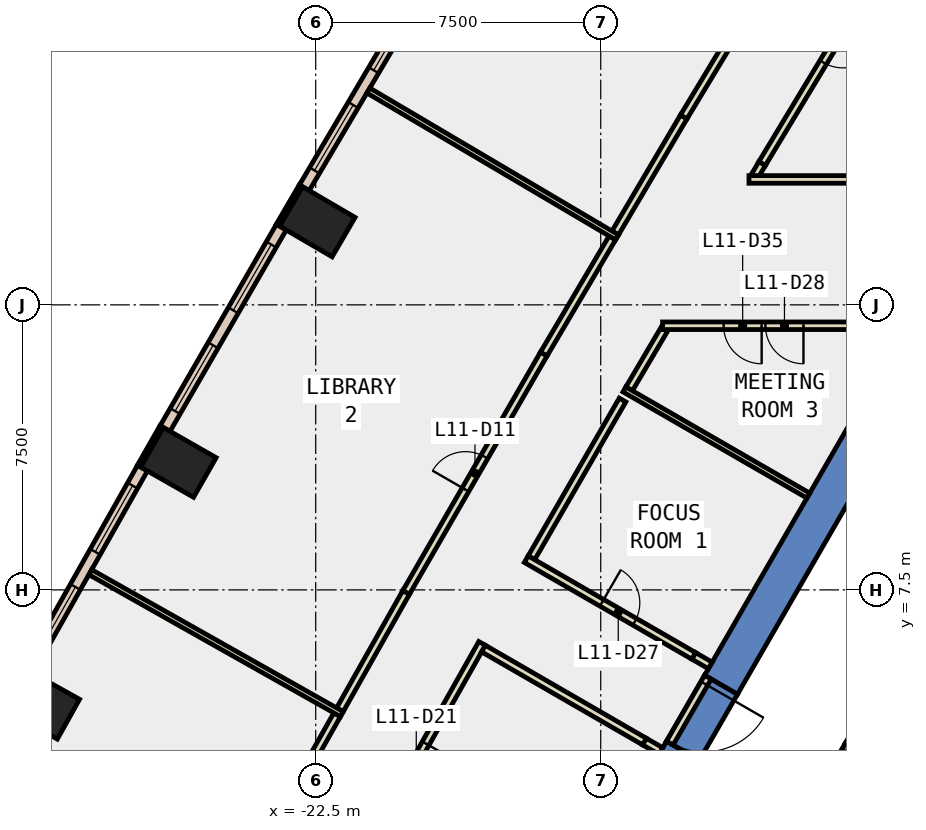
"""IFC4 building model, lengths in metres.
Left out: names, types, materials, properties, quantities, classifications, styles, units other than length and angle.
Written with IfcOpenShell. Run it as: python <this file> out.ifc"""

import sys

from ifc_helpers import new_model, si_unit, direction, frame, frame_2d, origin, origin_2d, place, context, subcontext, project, spatial, polyline, rectangle, outline, extrude, element, fill, save


model = new_model("IFC4")
c1 = context("Model", 3, precision=1e-05, world=origin(), true_north=direction((0.0, 1.0)))
c2 = subcontext(c1, "Body", "Model", "MODEL_VIEW")
j1 = project(units=[si_unit("LENGTHUNIT", "METRE"), si_unit("PLANEANGLEUNIT", "RADIAN")], contexts=[c1])
p1 = place(None, origin())
s1 = spatial("IfcSite", under=j1, at=p1, CompositionType="ELEMENT")
p2 = place(p1, origin())
s2 = spatial("IfcBuilding", under=s1, at=p2, CompositionType="ELEMENT")
p3 = place(p2, frame((0.0, 0.0, 56.0)))
s3 = spatial("IfcBuildingStorey", under=s2, at=p3, CompositionType="ELEMENT", Elevation=56.0)
for number, where, z_axis, x_axis in (
    (1, (-22.457, 17.186, -0.4), (0.0, 0.0, 1.0), (0.504, 0.864, 0.0)),
    (2, (-26.112, 10.855, -0.4), (0.0, 0.0, 1.0), (0.496, 0.869, 0.0)),
    (3, (-29.706, 4.487, -0.4), (0.0, 0.0, 1.0), (0.487, 0.873, 0.0)),
):
    element("IfcColumn", number, at=place(p3, frame(where, z_axis=z_axis, x_axis=x_axis)), inside=s3, PredefinedType="COLUMN", context=c2, shape_type="SweptSolid", body=[
        extrude(rectangle(XDim=1.2, YDim=1.6, at=origin_2d()), origin(), (0.0, 0.0, 1.0), 4.2),
    ])
p4 = place(p3, frame((0.0, 0.0, -0.4)))
e4 = element("IfcWall", 4, at=p4, inside=s3, PredefinedType="SHEAR", context=c2, shape_type="SweptSolid", body=[
    extrude(outline(polyline([(-12.267, 5.252), (-11.402, 4.752), (-6.351, 13.5), (-6.928, 14.5), (-12.267, 5.252)])), origin(), (0.0, 0.0, 1.0), 4.2),
])
p5 = place(p3, frame((0.0, 0.0, -0.4)))
e5 = element("IfcWall", 5, at=p5, inside=s3, PredefinedType="SHEAR", context=c2, shape_type="SweptSolid", body=[
    extrude(outline(polyline([(-12.402, 3.02), (-13.267, 3.52), (-13.856, 2.5), (-12.702, 2.5), (-12.402, 3.02)])), origin(), (0.0, 0.0, 1.0), 4.2),
])
p6 = place(p3, frame((0.0, 0.0, 3.6)))
e6 = element("IfcWall", 6, at=p6, inside=s3, PredefinedType="SHEAR", context=c2, shape_type="SweptSolid", body=[
    extrude(outline(polyline([(-13.267, 3.52), (-12.402, 3.02), (-11.402, 4.752), (-12.267, 5.252), (-13.267, 3.52)])), origin(), (0.0, 0.0, 1.0), 0.2),
])
p7 = place(p3, frame((-22.888, 18.133, 0.0), z_axis=(0.0, 0.0, 1.0), x_axis=(-0.504225229382, -0.863572184623, 0.0)))
e7 = element("IfcWall", 7, at=p7, inside=s3, PredefinedType="STANDARD", context=c2, shape_type="SweptSolid", body=[
    extrude(rectangle(XDim=1.2, YDim=0.1, at=frame_2d((0.6, 0.0))), origin(), (0.0, 0.0, 1.0), 3.8),
])
p8 = place(p3, frame((-26.553, 11.797, 0.0), z_axis=(0.0, 0.0, 1.0), x_axis=(-0.495766453659, -0.86845588456, 0.0)))
e8 = element("IfcWall", 8, at=p8, inside=s3, PredefinedType="STANDARD", context=c2, shape_type="SweptSolid", body=[
    extrude(rectangle(XDim=1.2, YDim=0.1, at=frame_2d((0.6, 0.0))), origin(), (0.0, 0.0, 1.0), 3.8),
])
p9 = place(p3, frame((-19.688, 23.351, 0.0), z_axis=(0.0, 0.0, 1.0), x_axis=(-0.508412153373, -0.861113861404, 0.0)))
e9 = element("IfcWall", 9, at=p9, inside=s3, PredefinedType="STANDARD", context=c2, shape_type="SweptSolid", body=[
    extrude(rectangle(XDim=6.121, YDim=0.3, at=frame_2d((3.061, 0.0))), origin(), (0.0, 0.0, 1.0), 3.8),
])
p10 = place(p9, frame((0.53, 0.0, 0.9)))
e10 = element("IfcOpeningElement", 10, at=p10, cuts=e9, PredefinedType="OPENING", context=c2, shape_type="SweptSolid", body=[
    extrude(rectangle(XDim=2.0, YDim=2.6, at=frame_2d((1.0, 1.3))), frame((0.0, 0.16, 0.0), z_axis=(0.0, -1.0, 0.0), x_axis=(1.0, 0.0, 0.0)), (0.0, 0.0, 1.0), 0.32),
])
p11 = place(p9, frame((3.591, 0.0, 0.9)))
e11 = element("IfcOpeningElement", 11, at=p11, cuts=e9, PredefinedType="OPENING", context=c2, shape_type="SweptSolid", body=[
    extrude(rectangle(XDim=2.0, YDim=2.6, at=frame_2d((1.0, 1.3))), frame((0.0, 0.16, 0.0), z_axis=(0.0, -1.0, 0.0), x_axis=(1.0, 0.0, 0.0)), (0.0, 0.0, 1.0), 0.32),
])
p12 = place(p3, frame((-23.404, 17.046, 0.0), z_axis=(0.0, 0.0, 1.0), x_axis=(-0.499957248001, -0.866050085256, 0.0)))
e12 = element("IfcWall", 12, at=p12, inside=s3, PredefinedType="STANDARD", context=c2, shape_type="SweptSolid", body=[
    extrude(rectangle(XDim=6.121, YDim=0.3, at=frame_2d((3.06, 0.0))), origin(), (0.0, 0.0, 1.0), 3.8),
])
p13 = place(p12, frame((0.53, 0.0, 0.9)))
e13 = element("IfcOpeningElement", 13, at=p13, cuts=e12, PredefinedType="OPENING", context=c2, shape_type="SweptSolid", body=[
    extrude(rectangle(XDim=2.0, YDim=2.6, at=frame_2d((1.0, 1.3))), frame((0.0, 0.16, 0.0), z_axis=(0.0, -1.0, 0.0), x_axis=(1.0, 0.0, 0.0)), (0.0, 0.0, 1.0), 0.32),
])
p14 = place(p12, frame((3.591, 0.0, 0.9)))
e14 = element("IfcOpeningElement", 14, at=p14, cuts=e12, PredefinedType="OPENING", context=c2, shape_type="SweptSolid", body=[
    extrude(rectangle(XDim=2.0, YDim=2.6, at=frame_2d((1.0, 1.3))), frame((0.0, 0.16, 0.0), z_axis=(0.0, -1.0, 0.0), x_axis=(1.0, 0.0, 0.0)), (0.0, 0.0, 1.0), 0.32),
])
p15 = place(p3, frame((-27.058, 10.705, 0.0), z_axis=(0.0, 0.0, 1.0), x_axis=(-0.49151046248, -0.870871669807, 0.0)))
e15 = element("IfcWall", 15, at=p15, inside=s3, PredefinedType="STANDARD", context=c2, shape_type="SweptSolid", body=[
    extrude(rectangle(XDim=6.122, YDim=0.3, at=frame_2d((3.061, 0.0))), origin(), (0.0, 0.0, 1.0), 3.8),
])
p16 = place(p15, frame((0.53, 0.0, 0.9)))
e16 = element("IfcOpeningElement", 16, at=p16, cuts=e15, PredefinedType="OPENING", context=c2, shape_type="SweptSolid", body=[
    extrude(rectangle(XDim=2.0, YDim=2.6, at=frame_2d((1.0, 1.3))), frame((0.0, 0.16, 0.0), z_axis=(0.0, -1.0, 0.0), x_axis=(1.0, 0.0, 0.0)), (0.0, 0.0, 1.0), 0.32),
])
p17 = place(p15, frame((3.591, 0.0, 0.9)))
e17 = element("IfcOpeningElement", 17, at=p17, cuts=e15, PredefinedType="OPENING", context=c2, shape_type="SweptSolid", body=[
    extrude(rectangle(XDim=2.0, YDim=2.6, at=frame_2d((1.0, 1.3))), frame((0.0, 0.16, 0.0), z_axis=(0.0, -1.0, 0.0), x_axis=(1.0, 0.0, 0.0)), (0.0, 0.0, 1.0), 0.32),
])
p18 = place(p3, frame((-14.425, 12.497, 0.0), z_axis=(0.0, 0.0, 1.0), x_axis=(-0.500026519606, -0.866010092142, 0.0)))
e18 = element("IfcWall", 18, at=p18, inside=s3, PredefinedType="PARTITIONING", context=c2, shape_type="SweptSolid", body=[
    extrude(rectangle(XDim=4.796, YDim=0.2, at=frame_2d((2.398, 0.0))), origin(), (0.0, 0.0, 1.0), 3.8),
])
p19 = place(p3, frame((-16.96, 8.308, 0.0), z_axis=(0.0, 0.0, 1.0), x_axis=(0.866018717003, -0.500011581666, 0.0)))
e19 = element("IfcWall", 19, at=p19, inside=s3, PredefinedType="PARTITIONING", context=c2, shape_type="SweptSolid", body=[
    extrude(rectangle(XDim=5.092, YDim=0.2, at=frame_2d((2.546, 0.0))), origin(), (0.0, 0.0, 1.0), 3.8),
])
p20 = place(p19, frame((2.296, 0.0, 0.0)))
e20 = element("IfcOpeningElement", 20, at=p20, cuts=e19, PredefinedType="OPENING", context=c2, shape_type="SweptSolid", body=[
    extrude(rectangle(XDim=1.0, YDim=2.1, at=frame_2d((0.5, 1.05))), frame((0.0, 0.11, 0.0), z_axis=(0.0, -1.0, 0.0), x_axis=(1.0, 0.0, 0.0)), (0.0, 0.0, 1.0), 0.22),
])
p21 = place(p3, frame((-13.323, 14.364, 0.0), z_axis=(0.0, 0.0, 1.0), x_axis=(-0.508274698505, -0.861195001646, 0.0)))
e21 = element("IfcWall", 21, at=p21, inside=s3, PredefinedType="PARTITIONING", context=c2, shape_type="SweptSolid", body=[
    extrude(rectangle(XDim=1.828, YDim=0.2, at=frame_2d((0.914, 0.0))), origin(), (0.0, 0.0, 1.0), 3.8),
])
p22 = place(p3, frame((-7.022, 24.899, 0.0), z_axis=(0.0, 0.0, 1.0), x_axis=(-0.516755973305, -0.856132737403, 0.0)))
e22 = element("IfcWall", 22, at=p22, inside=s3, PredefinedType="PARTITIONING", context=c2, shape_type="SweptSolid", body=[
    extrude(rectangle(XDim=7.222, YDim=0.2, at=frame_2d((3.611, 0.0))), origin(), (0.0, 0.0, 1.0), 3.8),
])
p23 = place(p22, frame((3.111, 0.0, 0.0)))
e23 = element("IfcOpeningElement", 23, at=p23, cuts=e22, PredefinedType="OPENING", context=c2, shape_type="SweptSolid", body=[
    extrude(rectangle(XDim=1.0, YDim=2.1, at=frame_2d((0.5, 1.05))), frame((0.0, 0.11, 0.0), z_axis=(0.0, -1.0, 0.0), x_axis=(1.0, 0.0, 0.0)), (0.0, 0.0, 1.0), 0.22),
])
p24 = place(p3, frame((-10.754, 18.716, 0.0), z_axis=(0.0, 0.0, 1.0), x_axis=(-0.506880801681, -0.862016155815, 0.0)))
e24 = element("IfcWall", 24, at=p24, inside=s3, PredefinedType="PARTITIONING", context=c2, shape_type="SweptSolid", body=[
    extrude(rectangle(XDim=0.383, YDim=0.2, at=frame_2d((0.191, 0.0))), origin(), (0.0, 0.0, 1.0), 3.8),
])
p25 = place(p3, frame((-13.417, 3.26, 0.0), z_axis=(0.0, 0.0, 1.0), x_axis=(-0.866071776036, 0.499919672301, 0.0)))
e25 = element("IfcWall", 25, at=p25, inside=s3, PredefinedType="PARTITIONING", context=c2, shape_type="SweptSolid", body=[
    extrude(rectangle(XDim=0.5, YDim=0.2, at=frame_2d((0.25, 0.0))), origin(), (0.0, 0.0, 1.0), 2.4),
])
p26 = place(p3, frame((-18.122, 6.092, 0.0), z_axis=(0.0, 0.0, 1.0), x_axis=(-0.491430359405, -0.870916874251, 0.0)))
e26 = element("IfcWall", 26, at=p26, inside=s3, PredefinedType="PARTITIONING", context=c2, shape_type="SweptSolid", body=[
    extrude(rectangle(XDim=7.047, YDim=0.2, at=frame_2d((3.523, 0.0))), origin(), (0.0, 0.0, 1.0), 3.8),
])
p27 = place(p26, frame((3.024, 0.0, 0.0)))
e27 = element("IfcOpeningElement", 27, at=p27, cuts=e26, PredefinedType="OPENING", context=c2, shape_type="SweptSolid", body=[
    extrude(rectangle(XDim=1.0, YDim=2.1, at=frame_2d((0.5, 1.05))), frame((0.0, 0.11, 0.0), z_axis=(0.0, -1.0, 0.0), x_axis=(1.0, 0.0, 0.0)), (0.0, 0.0, 1.0), 0.22),
])
p28 = place(p3, frame((-14.618, 16.891, 0.0), z_axis=(0.0, 0.0, 1.0), x_axis=(0.508267810274, 0.861199067022, 0.0)))
e28 = element("IfcWall", 28, at=p28, inside=s3, PredefinedType="PARTITIONING", context=c2, shape_type="SweptSolid", body=[
    extrude(rectangle(XDim=3.547, YDim=0.2, at=frame_2d((1.774, 0.0))), origin(), (0.0, 0.0, 1.0), 3.8),
])
p29 = place(p3, frame((-12.815, 19.946, 0.0), z_axis=(0.0, 0.0, 1.0), x_axis=(0.516822021522, 0.856092867667, 0.0)))
e29 = element("IfcWall", 29, at=p29, inside=s3, PredefinedType="PARTITIONING", context=c2, shape_type="SweptSolid", body=[
    extrude(rectangle(XDim=7.171, YDim=0.2, at=frame_2d((3.585, 0.0))), origin(), (0.0, 0.0, 1.0), 3.8),
])
p30 = place(p29, frame((3.16, 0.0, 0.0)))
e30 = element("IfcOpeningElement", 30, at=p30, cuts=e29, PredefinedType="OPENING", context=c2, shape_type="SweptSolid", body=[
    extrude(rectangle(XDim=1.0, YDim=2.1, at=frame_2d((0.5, 1.05))), frame((0.0, 0.11, 0.0), z_axis=(0.0, -1.0, 0.0), x_axis=(1.0, 0.0, 0.0)), (0.0, 0.0, 1.0), 0.22),
])
p31 = place(p3, frame((-21.863, 4.345, 0.0), z_axis=(0.0, 0.0, 1.0), x_axis=(0.491394823876, 0.87093692485, 0.0)))
e31 = element("IfcWall", 31, at=p31, inside=s3, PredefinedType="PARTITIONING", context=c2, shape_type="SweptSolid", body=[
    extrude(rectangle(XDim=3.547, YDim=0.2, at=frame_2d((1.773, 0.0))), origin(), (0.0, 0.0, 1.0), 3.8),
])
p32 = place(p3, frame((-20.12, 7.434, 0.0), z_axis=(0.0, 0.0, 1.0), x_axis=(0.500039488902, 0.866002603656, 0.0)))
e32 = element("IfcWall", 32, at=p32, inside=s3, PredefinedType="PARTITIONING", context=c2, shape_type="SweptSolid", body=[
    extrude(rectangle(XDim=7.244, YDim=0.2, at=frame_2d((3.622, 0.0))), origin(), (0.0, 0.0, 1.0), 3.8),
])
p33 = place(p32, frame((3.122, 0.0, 0.0)))
e33 = element("IfcOpeningElement", 33, at=p33, cuts=e32, PredefinedType="OPENING", context=c2, shape_type="SweptSolid", body=[
    extrude(rectangle(XDim=1.0, YDim=2.1, at=frame_2d((0.5, 1.05))), frame((0.0, 0.11, 0.0), z_axis=(0.0, -1.0, 0.0), x_axis=(1.0, 0.0, 0.0)), (0.0, 0.0, 1.0), 0.22),
])
p34 = place(p3, frame((-16.498, 13.707, 0.0), z_axis=(0.0, 0.0, 1.0), x_axis=(0.508471945541, 0.861078556578, 0.0)))
e34 = element("IfcWall", 34, at=p34, inside=s3, PredefinedType="PARTITIONING", context=c2, shape_type="SweptSolid", body=[
    extrude(rectangle(XDim=3.548, YDim=0.2, at=frame_2d((1.774, 0.0))), origin(), (0.0, 0.0, 1.0), 3.8),
])
p35 = place(p3, frame((-23.681, 1.124, 0.0), z_axis=(0.0, 0.0, 1.0), x_axis=(0.491485799319, 0.870885588965, 0.0)))
e35 = element("IfcWall", 35, at=p35, inside=s3, PredefinedType="PARTITIONING", context=c2, shape_type="SweptSolid", body=[
    extrude(rectangle(XDim=3.548, YDim=0.2, at=frame_2d((1.774, 0.0))), origin(), (0.0, 0.0, 1.0), 3.8),
])
p36 = place(p3, frame((-14.377, 12.775, 0.0), z_axis=(0.0, 0.0, 1.0), x_axis=(0.866051730117, -0.499954398681, 0.0)))
e36 = element("IfcWall", 36, at=p36, inside=s3, PredefinedType="PARTITIONING", context=c2, shape_type="SweptSolid", body=[
    extrude(rectangle(XDim=5.588, YDim=0.15, at=frame_2d((2.794, 0.0))), origin(), (0.0, 0.0, 1.0), 3.8),
])
p37 = place(p3, frame((-6.957, 14.45, 0.0), z_axis=(0.0, 0.0, 1.0), x_axis=(-1.0, 0.0, 0.0)))
e37 = element("IfcWall", 37, at=p37, inside=s3, PredefinedType="PARTITIONING", context=c2, shape_type="SweptSolid", body=[
    extrude(rectangle(XDim=6.415, YDim=0.2, at=frame_2d((3.208, 0.0))), origin(), (0.0, 0.0, 1.0), 3.8),
])
p38 = place(p37, frame((2.708, 0.0, 0.0)))
e38 = element("IfcOpeningElement", 38, at=p38, cuts=e37, PredefinedType="OPENING", context=c2, shape_type="SweptSolid", body=[
    extrude(rectangle(XDim=1.0, YDim=2.1, at=frame_2d((0.5, 1.05))), frame((0.0, 0.11, 0.0), z_axis=(0.0, -1.0, 0.0), x_axis=(1.0, 0.0, 0.0)), (0.0, 0.0, 1.0), 0.22),
])
p39 = place(p37, frame((3.808, 0.0, 0.0)))
e39 = element("IfcOpeningElement", 39, at=p39, cuts=e37, PredefinedType="OPENING", context=c2, shape_type="SweptSolid", body=[
    extrude(rectangle(XDim=1.0, YDim=2.1, at=frame_2d((0.5, 1.05))), frame((0.0, 0.11, 0.0), z_axis=(0.0, -1.0, 0.0), x_axis=(1.0, 0.0, 0.0)), (0.0, 0.0, 1.0), 0.22),
])
p40 = place(p3, frame((-11.099, 18.3, 0.0), z_axis=(0.0, 0.0, 1.0), x_axis=(1.0, 0.0, 0.0)))
e40 = element("IfcWall", 40, at=p40, inside=s3, PredefinedType="PARTITIONING", context=c2, shape_type="SweptSolid", body=[
    extrude(rectangle(XDim=10.699, YDim=0.2, at=frame_2d((5.35, 0.0))), origin(), (0.0, 0.0, 1.0), 3.8),
])
p41 = place(p3, frame((-14.57, 16.776, 0.0), z_axis=(0.0, 0.0, 1.0), x_axis=(-0.861124703857, 0.508393788718, 0.0)))
e41 = element("IfcWall", 41, at=p41, inside=s3, PredefinedType="PARTITIONING", context=c2, shape_type="SweptSolid", body=[
    extrude(rectangle(XDim=7.6, YDim=0.15, at=frame_2d((3.8, 0.0))), origin(), (0.0, 0.0, 1.0), 3.8),
])
p42 = place(p3, frame((-21.813, 4.231, 0.0), z_axis=(0.0, 0.0, 1.0), x_axis=(-0.870901264369, 0.491458022337, 0.0)))
e42 = element("IfcWall", 42, at=p42, inside=s3, PredefinedType="PARTITIONING", context=c2, shape_type="SweptSolid", body=[
    extrude(rectangle(XDim=7.6, YDim=0.15, at=frame_2d((3.8, 0.0))), origin(), (0.0, 0.0, 1.0), 3.8),
])
p43 = place(p3, frame((-12.18, 5.202, 0.0), z_axis=(0.0, 0.0, 1.0), x_axis=(-0.50002537861, -0.866010750942, 0.0)))
e43 = element("IfcWall", 43, at=p43, inside=s3, PredefinedType="PARTITIONING", context=c2, shape_type="SweptSolid", body=[
    extrude(rectangle(XDim=2.0, YDim=0.2, at=frame_2d((1.0, 0.0))), origin(), (0.0, 0.0, 1.0), 2.4),
])
p44 = place(p43, frame((0.19, 0.0, 0.0)))
e44 = element("IfcOpeningElement", 44, at=p44, cuts=e43, PredefinedType="OPENING", context=c2, shape_type="SweptSolid", body=[
    extrude(rectangle(XDim=1.8, YDim=2.1, at=frame_2d((0.9, 1.05))), frame((0.0, 0.11, 0.0), z_axis=(0.0, -1.0, 0.0), x_axis=(1.0, 0.0, 0.0)), (0.0, 0.0, 1.0), 0.22),
])
p45 = place(p3, frame((-12.55, 5.762, 0.0), z_axis=(0.0, 0.0, 1.0), x_axis=(0.866071776036, -0.499919672301, 0.0)))
e45 = element("IfcWall", 45, at=p45, inside=s3, PredefinedType="PARTITIONING", context=c2, shape_type="SweptSolid", body=[
    extrude(rectangle(XDim=0.5, YDim=0.2, at=frame_2d((0.25, 0.0))), origin(), (0.0, 0.0, 1.0), 2.4),
])
p46 = place(p3, frame((-13.85, 3.51, 0.0), z_axis=(0.0, 0.0, 1.0), x_axis=(-0.865969361037, 0.500097056325, 0.0)))
e46 = element("IfcWall", 46, at=p46, inside=s3, PredefinedType="PARTITIONING", context=c2, shape_type="SweptSolid", body=[
    extrude(rectangle(XDim=4.889, YDim=0.2, at=frame_2d((2.445, 0.0))), origin(), (0.0, 0.0, 1.0), 3.8),
])
p47 = place(p3, frame((-6.25, 2.01, 0.0), z_axis=(0.0, 0.0, 1.0), x_axis=(-0.86611865017, 0.499838457731, 0.0)))
e47 = element("IfcWall", 47, at=p47, inside=s3, PredefinedType="STANDARD", context=c2, shape_type="SweptSolid", body=[
    extrude(rectangle(XDim=2.733, YDim=0.2, at=frame_2d((1.366, 0.0))), origin(), (0.0, 0.0, 1.0), 3.8),
])
p48 = place(p3, frame((-5.03, 9.388, 0.0), z_axis=(0.0, 0.0, 1.0), x_axis=(-0.499978703459, -0.866037698999, 0.0)))
e48 = element("IfcWall", 48, at=p48, inside=s3, PredefinedType="STANDARD", context=c2, shape_type="SweptSolid", body=[
    extrude(rectangle(XDim=6.9, YDim=0.2, at=frame_2d((3.45, 0.0))), origin(), (0.0, 0.0, 1.0), 3.8),
])
p49 = place(p10, origin())
e49 = element("IfcWindow", 49, at=p49, inside=s3, PartitioningType="SINGLE_PANEL", PredefinedType="WINDOW", context=c2, shape_type="SweptSolid", body=[
    extrude(rectangle(XDim=2.0, YDim=2.6, at=frame_2d((1.0, 1.3))), frame((0.0, 0.03, 0.0), z_axis=(0.0, -1.0, 0.0), x_axis=(1.0, 0.0, 0.0)), (0.0, 0.0, 1.0), 0.06),
])
fill(e10, e49)
p50 = place(p11, origin())
e50 = element("IfcWindow", 50, at=p50, inside=s3, PartitioningType="SINGLE_PANEL", PredefinedType="WINDOW", context=c2, shape_type="SweptSolid", body=[
    extrude(rectangle(XDim=2.0, YDim=2.6, at=frame_2d((1.0, 1.3))), frame((0.0, 0.03, 0.0), z_axis=(0.0, -1.0, 0.0), x_axis=(1.0, 0.0, 0.0)), (0.0, 0.0, 1.0), 0.06),
])
fill(e11, e50)
p51 = place(p13, origin())
e51 = element("IfcWindow", 51, at=p51, inside=s3, PartitioningType="SINGLE_PANEL", PredefinedType="WINDOW", context=c2, shape_type="SweptSolid", body=[
    extrude(rectangle(XDim=2.0, YDim=2.6, at=frame_2d((1.0, 1.3))), frame((0.0, 0.03, 0.0), z_axis=(0.0, -1.0, 0.0), x_axis=(1.0, 0.0, 0.0)), (0.0, 0.0, 1.0), 0.06),
])
fill(e13, e51)
p52 = place(p14, origin())
e52 = element("IfcWindow", 52, at=p52, inside=s3, PartitioningType="SINGLE_PANEL", PredefinedType="WINDOW", context=c2, shape_type="SweptSolid", body=[
    extrude(rectangle(XDim=2.0, YDim=2.6, at=frame_2d((1.0, 1.3))), frame((0.0, 0.03, 0.0), z_axis=(0.0, -1.0, 0.0), x_axis=(1.0, 0.0, 0.0)), (0.0, 0.0, 1.0), 0.06),
])
fill(e14, e52)
p53 = place(p16, origin())
e53 = element("IfcWindow", 53, at=p53, inside=s3, PartitioningType="SINGLE_PANEL", PredefinedType="WINDOW", context=c2, shape_type="SweptSolid", body=[
    extrude(rectangle(XDim=2.0, YDim=2.6, at=frame_2d((1.0, 1.3))), frame((0.0, 0.03, 0.0), z_axis=(0.0, -1.0, 0.0), x_axis=(1.0, 0.0, 0.0)), (0.0, 0.0, 1.0), 0.06),
])
fill(e16, e53)
p54 = place(p17, origin())
e54 = element("IfcWindow", 54, at=p54, inside=s3, PartitioningType="SINGLE_PANEL", PredefinedType="WINDOW", context=c2, shape_type="SweptSolid", body=[
    extrude(rectangle(XDim=2.0, YDim=2.6, at=frame_2d((1.0, 1.3))), frame((0.0, 0.03, 0.0), z_axis=(0.0, -1.0, 0.0), x_axis=(1.0, 0.0, 0.0)), (0.0, 0.0, 1.0), 0.06),
])
fill(e17, e54)
p55 = place(p33, origin())
e55 = element("IfcDoor", 55, at=p55, inside=s3, OperationType="SINGLE_SWING_LEFT", PredefinedType="DOOR", context=c2, shape_type="SweptSolid", body=[
    extrude(rectangle(XDim=1.0, YDim=2.1, at=frame_2d((0.5, 1.05))), frame((0.0, 0.025, 0.0), z_axis=(0.0, -1.0, 0.0), x_axis=(1.0, 0.0, 0.0)), (0.0, 0.0, 1.0), 0.05),
])
fill(e33, e55)
p56 = place(p23, origin())
e56 = element("IfcDoor", 56, at=p56, inside=s3, OperationType="SINGLE_SWING_LEFT", PredefinedType="DOOR", context=c2, shape_type="SweptSolid", body=[
    extrude(rectangle(XDim=1.0, YDim=2.1, at=frame_2d((0.5, 1.05))), frame((0.0, 0.025, 0.0), z_axis=(0.0, -1.0, 0.0), x_axis=(1.0, 0.0, 0.0)), (0.0, 0.0, 1.0), 0.05),
])
fill(e23, e56)
p57 = place(p27, origin())
e57 = element("IfcDoor", 57, at=p57, inside=s3, OperationType="SINGLE_SWING_LEFT", PredefinedType="DOOR", context=c2, shape_type="SweptSolid", body=[
    extrude(rectangle(XDim=1.0, YDim=2.1, at=frame_2d((0.5, 1.05))), frame((0.0, 0.025, 0.0), z_axis=(0.0, -1.0, 0.0), x_axis=(1.0, 0.0, 0.0)), (0.0, 0.0, 1.0), 0.05),
])
fill(e27, e57)
p58 = place(p20, origin())
e58 = element("IfcDoor", 58, at=p58, inside=s3, OperationType="SINGLE_SWING_LEFT", PredefinedType="DOOR", context=c2, shape_type="SweptSolid", body=[
    extrude(rectangle(XDim=1.0, YDim=2.1, at=frame_2d((0.5, 1.05))), frame((0.0, 0.025, 0.0), z_axis=(0.0, -1.0, 0.0), x_axis=(1.0, 0.0, 0.0)), (0.0, 0.0, 1.0), 0.05),
])
fill(e20, e58)
p59 = place(p38, origin())
e59 = element("IfcDoor", 59, at=p59, inside=s3, OperationType="SINGLE_SWING_LEFT", PredefinedType="DOOR", context=c2, shape_type="SweptSolid", body=[
    extrude(rectangle(XDim=1.0, YDim=2.1, at=frame_2d((0.5, 1.05))), frame((0.0, 0.025, 0.0), z_axis=(0.0, -1.0, 0.0), x_axis=(1.0, 0.0, 0.0)), (0.0, 0.0, 1.0), 0.05),
])
fill(e38, e59)
p60 = place(p39, origin())
e60 = element("IfcDoor", 60, at=p60, inside=s3, OperationType="SINGLE_SWING_RIGHT", PredefinedType="DOOR", context=c2, shape_type="SweptSolid", body=[
    extrude(rectangle(XDim=1.0, YDim=2.1, at=frame_2d((0.5, 1.05))), frame((0.0, 0.025, 0.0), z_axis=(0.0, -1.0, 0.0), x_axis=(1.0, 0.0, 0.0)), (0.0, 0.0, 1.0), 0.05),
])
fill(e39, e60)
p61 = place(p44, origin())
e61 = element("IfcDoor", 61, at=p61, inside=s3, OperationType="DOUBLE_DOOR_SINGLE_SWING", PredefinedType="DOOR", context=c2, shape_type="SweptSolid", body=[
    extrude(rectangle(XDim=1.8, YDim=2.1, at=frame_2d((0.9, 1.05))), frame((0.0, 0.025, 0.0), z_axis=(0.0, -1.0, 0.0), x_axis=(1.0, 0.0, 0.0)), (0.0, 0.0, 1.0), 0.05),
])
fill(e44, e61)
save(model, sys.argv[1])
